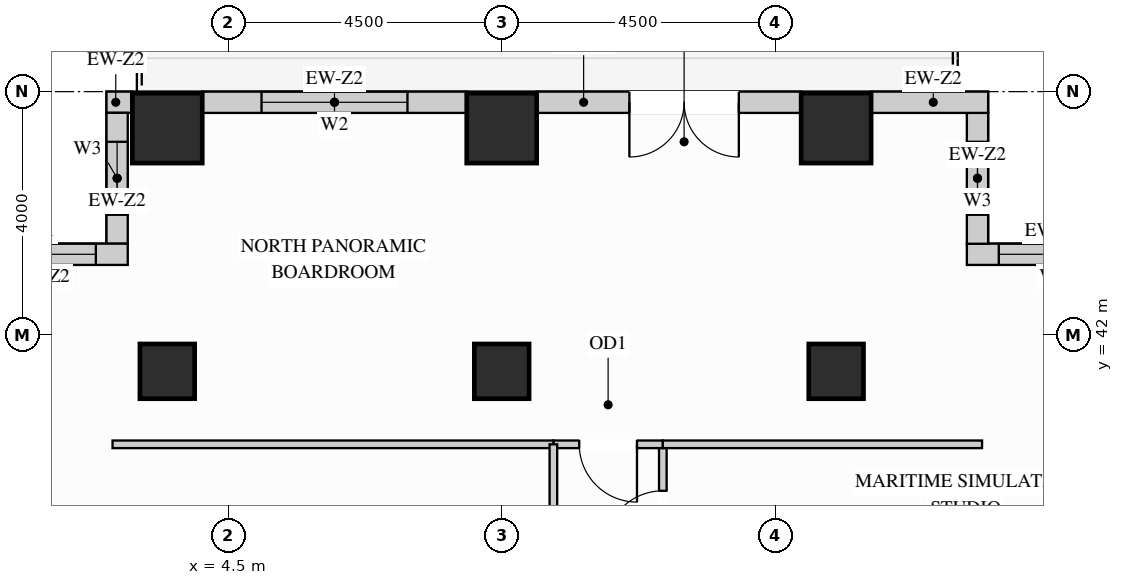
"""IFC4 building model, lengths in metres.
Left out: names, types, materials, properties, quantities, classifications, styles, units other than length and angle.
Written with IfcOpenShell. Run it as: python <this file> out.ifc"""

import sys

from ifc_helpers import new_model, si_unit, direction, frame, frame_2d, origin, origin_2d, place, context, subcontext, project, spatial, rectangle, extrude, source, transform, mapped, element, fill, save


model = new_model("IFC4")
c1 = context("Model", 3, precision=1e-05, world=origin(), true_north=direction((0.0, 1.0)))
c2 = subcontext(c1, "Body", "Model", "MODEL_VIEW")
j1 = project(units=[si_unit("LENGTHUNIT", "METRE"), si_unit("PLANEANGLEUNIT", "RADIAN")], contexts=[c1])
p1 = place(None, origin())
s1 = spatial("IfcSite", under=j1, at=p1, CompositionType="ELEMENT")
p2 = place(p1, origin())
s2 = spatial("IfcBuilding", under=s1, at=p2, CompositionType="ELEMENT")
p3 = place(p2, frame((0.0, 0.0, 77.4)))
s3 = spatial("IfcBuildingStorey", under=s2, at=p3, CompositionType="ELEMENT", Elevation=77.4)
m1 = source(origin(), c2, "Body", "SweptSolid", [
    extrude(rectangle(XDim=0.9, YDim=0.9, at=origin_2d()), origin(), (0.0, 0.0, 1.0), 3.38),
])
for number, where, z_axis, x_axis in (
    (1, (14.5, 41.4, 0.0), (0.0, 0.0, 1.0), (1.0, 0.0, 0.0)),
    (2, (3.5, 41.4, 0.0), (0.0, 0.0, 1.0), (1.0, 0.0, 0.0)),
    (3, (9.0, 41.4, 0.0), (0.0, 0.0, 1.0), (1.0, 0.0, 0.0)),
):
    element("IfcColumn", number, at=place(p3, frame(where, z_axis=z_axis, x_axis=x_axis)), inside=s3, PredefinedType="COLUMN", context=c2, shape_type="MappedRepresentation", body=[
        mapped(m1, transform((0.0, 0.0, 0.0), x_axis=(1.0, 0.0, 0.0), y_axis=(0.0, 1.0, 0.0), z_axis=(0.0, 0.0, 1.0))),
    ])
m2 = source(origin(), c2, "Body", "SweptSolid", [
    extrude(rectangle(XDim=1.15, YDim=1.15, at=origin_2d()), origin(), (0.0, 0.0, 1.0), 3.38),
])
for number, where, z_axis, x_axis in (
    (4, (14.5, 45.4, 0.0), (0.0, 0.0, 1.0), (1.0, 0.0, 0.0)),
    (5, (3.5, 45.4, 0.0), (0.0, 0.0, 1.0), (1.0, 0.0, 0.0)),
    (6, (9.0, 45.4, 0.0), (0.0, 0.0, 1.0), (1.0, 0.0, 0.0)),
):
    element("IfcColumn", number, at=place(p3, frame(where, z_axis=z_axis, x_axis=x_axis)), inside=s3, PredefinedType="COLUMN", context=c2, shape_type="MappedRepresentation", body=[
        mapped(m2, transform((0.0, 0.0, 0.0), x_axis=(1.0, 0.0, 0.0), y_axis=(0.0, 1.0, 0.0), z_axis=(0.0, 0.0, 1.0))),
    ])
p4 = place(p3, frame((19.5, 43.325, 0.0), z_axis=(0.0, 0.0, 1.0), x_axis=(-1.0, 0.0, 0.0)))
e7 = element("IfcWall", 7, at=p4, inside=s3, PredefinedType="SOLIDWALL", context=c2, shape_type="SweptSolid", body=[
    extrude(rectangle(XDim=2.85, YDim=0.35, at=frame_2d((1.425, 0.0))), origin(), (0.0, 0.0, 1.0), 3.365),
])
p5 = place(p4, frame((0.525, 0.0, 0.78)))
e8 = element("IfcOpeningElement", 8, at=p5, cuts=e7, PredefinedType="OPENING", context=c2, shape_type="SweptSolid", body=[
    extrude(rectangle(XDim=1.8, YDim=2.1, at=frame_2d((0.9, 1.05))), frame((0.0, 0.185, 0.0), z_axis=(0.0, -1.0, 0.0), x_axis=(1.0, 0.0, 0.0)), (0.0, 0.0, 1.0), 0.37),
])
p6 = place(p3, frame((16.825, 43.498, 0.0), z_axis=(0.0, 0.0, 1.0), x_axis=(0.0, 1.0, 0.0)))
e9 = element("IfcWall", 9, at=p6, inside=s3, PredefinedType="SOLIDWALL", context=c2, shape_type="SweptSolid", body=[
    extrude(rectangle(XDim=2.154, YDim=0.35, at=frame_2d((1.077, 0.0))), origin(), (0.0, 0.0, 1.0), 3.365),
])
p7 = place(p6, frame((0.477, 0.0, 0.78)))
e10 = element("IfcOpeningElement", 10, at=p7, cuts=e9, PredefinedType="OPENING", context=c2, shape_type="SweptSolid", body=[
    extrude(rectangle(XDim=1.2, YDim=2.1, at=frame_2d((0.6, 1.05))), frame((0.0, 0.185, 0.0), z_axis=(0.0, -1.0, 0.0), x_axis=(1.0, 0.0, 0.0)), (0.0, 0.0, 1.0), 0.37),
])
m3 = source(origin(), c2, "Body", "SweptSolid", [
    extrude(rectangle(XDim=1.927, YDim=0.35, at=frame_2d((0.963, 0.0))), origin(), (0.0, 0.0, 1.0), 3.365),
])
p8 = place(p3, frame((17.0, 45.825, 0.0), z_axis=(0.0, 0.0, 1.0), x_axis=(-1.0, 0.0, 0.0)))
e11 = element("IfcWall", 11, at=p8, inside=s3, PredefinedType="SOLIDWALL", context=c2, shape_type="MappedRepresentation", body=[
    mapped(m3, transform((0.0, 0.0, 0.0), x_axis=(1.0, 0.0, 0.0), y_axis=(0.0, 1.0, 0.0), z_axis=(0.0, 0.0, 1.0))),
])
p9 = place(p3, frame((13.927, 45.825, 0.0), z_axis=(0.0, 0.0, 1.0), x_axis=(-1.0, 0.0, 0.0)))
e12 = element("IfcWall", 12, at=p9, inside=s3, PredefinedType="SOLIDWALL", context=c2, shape_type="SweptSolid", body=[
    extrude(rectangle(XDim=4.354, YDim=0.35, at=frame_2d((2.177, 0.0))), origin(), (0.0, 0.0, 1.0), 3.365),
])
p10 = place(p9, frame((1.027, 0.0, 0.0)))
e13 = element("IfcOpeningElement", 13, at=p10, cuts=e12, PredefinedType="OPENING", context=c2, shape_type="SweptSolid", body=[
    extrude(rectangle(XDim=1.8, YDim=2.2, at=frame_2d((0.9, 1.1))), frame((0.0, 0.185, 0.0), z_axis=(0.0, -1.0, 0.0), x_axis=(1.0, 0.0, 0.0)), (0.0, 0.0, 1.0), 0.37),
])
p11 = place(p3, frame((8.427, 45.825, 0.0), z_axis=(0.0, 0.0, 1.0), x_axis=(-1.0, 0.0, 0.0)))
e14 = element("IfcWall", 14, at=p11, inside=s3, PredefinedType="SOLIDWALL", context=c2, shape_type="SweptSolid", body=[
    extrude(rectangle(XDim=4.354, YDim=0.35, at=frame_2d((2.177, 0.0))), origin(), (0.0, 0.0, 1.0), 3.365),
])
p12 = place(p11, frame((0.977, 0.0, 0.78)))
e15 = element("IfcOpeningElement", 15, at=p12, cuts=e14, PredefinedType="OPENING", context=c2, shape_type="SweptSolid", body=[
    extrude(rectangle(XDim=2.4, YDim=2.1, at=frame_2d((1.2, 1.05))), frame((0.0, 0.185, 0.0), z_axis=(0.0, -1.0, 0.0), x_axis=(1.0, 0.0, 0.0)), (0.0, 0.0, 1.0), 0.37),
])
m4 = source(origin(), c2, "Body", "SweptSolid", [
    extrude(rectangle(XDim=0.427, YDim=0.35, at=frame_2d((0.213, 0.0))), origin(), (0.0, 0.0, 1.0), 3.365),
])
p13 = place(p3, frame((2.927, 45.825, 0.0), z_axis=(0.0, 0.0, 1.0), x_axis=(-1.0, 0.0, 0.0)))
e16 = element("IfcWall", 16, at=p13, inside=s3, PredefinedType="SOLIDWALL", context=c2, shape_type="MappedRepresentation", body=[
    mapped(m4, transform((0.0, 0.0, 0.0), x_axis=(1.0, 0.0, 0.0), y_axis=(0.0, 1.0, 0.0), z_axis=(0.0, 0.0, 1.0))),
])
p14 = place(p3, frame((2.675, 45.652, 0.0), z_axis=(0.0, 0.0, 1.0), x_axis=(0.0, -1.0, 0.0)))
e17 = element("IfcWall", 17, at=p14, inside=s3, PredefinedType="SOLIDWALL", context=c2, shape_type="SweptSolid", body=[
    extrude(rectangle(XDim=2.154, YDim=0.35, at=frame_2d((1.077, 0.0))), origin(), (0.0, 0.0, 1.0), 3.365),
])
p15 = place(p14, frame((0.477, 0.0, 0.78)))
e18 = element("IfcOpeningElement", 18, at=p15, cuts=e17, PredefinedType="OPENING", context=c2, shape_type="SweptSolid", body=[
    extrude(rectangle(XDim=1.2, YDim=2.1, at=frame_2d((0.6, 1.05))), frame((0.0, 0.185, 0.0), z_axis=(0.0, -1.0, 0.0), x_axis=(1.0, 0.0, 0.0)), (0.0, 0.0, 1.0), 0.37),
])
p16 = place(p3, frame((2.85, 43.325, 0.0), z_axis=(0.0, 0.0, 1.0), x_axis=(-1.0, 0.0, 0.0)))
e19 = element("IfcWall", 19, at=p16, inside=s3, PredefinedType="SOLIDWALL", context=c2, shape_type="SweptSolid", body=[
    extrude(rectangle(XDim=2.85, YDim=0.35, at=frame_2d((1.425, 0.0))), origin(), (0.0, 0.0, 1.0), 3.365),
])
p17 = place(p16, frame((0.525, 0.0, 0.78)))
e20 = element("IfcOpeningElement", 20, at=p17, cuts=e19, PredefinedType="OPENING", context=c2, shape_type="SweptSolid", body=[
    extrude(rectangle(XDim=1.8, YDim=2.1, at=frame_2d((0.9, 1.05))), frame((0.0, 0.185, 0.0), z_axis=(0.0, -1.0, 0.0), x_axis=(1.0, 0.0, 0.0)), (0.0, 0.0, 1.0), 0.37),
])
p18 = place(p3, frame((11.65, 37.721, 0.0), z_axis=(0.0, 0.0, 1.0), x_axis=(0.0, 1.0, 0.0)))
e21 = element("IfcWall", 21, at=p18, inside=s3, PredefinedType="PARTITIONING", context=c2, shape_type="SweptSolid", body=[
    extrude(rectangle(XDim=2.479, YDim=0.125, at=frame_2d((1.24, 0.0))), origin(), (0.0, 0.0, 1.0), 3.365),
])
p19 = place(p18, frame((0.764, 0.0, 0.0)))
e22 = element("IfcOpeningElement", 22, at=p19, cuts=e21, PredefinedType="OPENING", context=c2, shape_type="SweptSolid", body=[
    extrude(rectangle(XDim=0.95, YDim=2.15, at=frame_2d((0.475, 1.075))), frame((0.0, 0.073, 0.0), z_axis=(0.0, -1.0, 0.0), x_axis=(1.0, 0.0, 0.0)), (0.0, 0.0, 1.0), 0.145),
])
p20 = place(p3, frame((9.85, 40.2, 0.0), z_axis=(0.0, 0.0, 1.0), x_axis=(1.0, 0.0, 0.0)))
e23 = element("IfcWall", 23, at=p20, inside=s3, PredefinedType="PARTITIONING", context=c2, shape_type="SweptSolid", body=[
    extrude(rectangle(XDim=1.8, YDim=0.125, at=frame_2d((0.9, 0.0))), origin(), (0.0, 0.0, 1.0), 3.365),
])
p21 = place(p20, frame((0.425, 0.0, 0.0)))
e24 = element("IfcOpeningElement", 24, at=p21, cuts=e23, PredefinedType="OPENING", context=c2, shape_type="SweptSolid", body=[
    extrude(rectangle(XDim=0.95, YDim=2.15, at=frame_2d((0.475, 1.075))), frame((0.0, 0.073, 0.0), z_axis=(0.0, -1.0, 0.0), x_axis=(1.0, 0.0, 0.0)), (0.0, 0.0, 1.0), 0.145),
])
m5 = source(origin(), c2, "Body", "SweptSolid", [
    extrude(rectangle(XDim=5.25, YDim=0.125, at=frame_2d((2.625, 0.0))), origin(), (0.0, 0.0, 1.0), 3.365),
])
p22 = place(p3, frame((11.65, 40.2, 0.0), z_axis=(0.0, 0.0, 1.0), x_axis=(1.0, 0.0, 0.0)))
e25 = element("IfcWall", 25, at=p22, inside=s3, PredefinedType="PARTITIONING", context=c2, shape_type="MappedRepresentation", body=[
    mapped(m5, transform((0.0, 0.0, 0.0), x_axis=(1.0, 0.0, 0.0), y_axis=(0.0, 1.0, 0.0), z_axis=(0.0, 0.0, 1.0))),
])
m6 = source(origin(), c2, "Body", "SweptSolid", [
    extrude(rectangle(XDim=7.25, YDim=0.125, at=frame_2d((3.625, 0.0))), origin(), (0.0, 0.0, 1.0), 3.365),
])
p23 = place(p3, frame((2.6, 40.2, 0.0), z_axis=(0.0, 0.0, 1.0), x_axis=(1.0, 0.0, 0.0)))
e26 = element("IfcWall", 26, at=p23, inside=s3, PredefinedType="PARTITIONING", context=c2, shape_type="MappedRepresentation", body=[
    mapped(m6, transform((0.0, 0.0, 0.0), x_axis=(1.0, 0.0, 0.0), y_axis=(0.0, 1.0, 0.0), z_axis=(0.0, 0.0, 1.0))),
])
p24 = place(p3, frame((9.85, 35.498, 0.0), z_axis=(0.0, 0.0, 1.0), x_axis=(0.0, 1.0, 0.0)))
e27 = element("IfcWall", 27, at=p24, inside=s3, PredefinedType="PARTITIONING", context=c2, shape_type="SweptSolid", body=[
    extrude(rectangle(XDim=4.702, YDim=0.125, at=frame_2d((2.351, 0.0))), origin(), (0.0, 0.0, 1.0), 3.365),
])
p25 = place(p24, frame((0.392, 0.0, 0.0)))
e28 = element("IfcOpeningElement", 28, at=p25, cuts=e27, PredefinedType="OPENING", context=c2, shape_type="SweptSolid", body=[
    extrude(rectangle(XDim=0.95, YDim=2.15, at=frame_2d((0.475, 1.075))), frame((0.0, 0.073, 0.0), z_axis=(0.0, -1.0, 0.0), x_axis=(1.0, 0.0, 0.0)), (0.0, 0.0, 1.0), 0.145),
])
m7 = source(origin(), c2, "Body", "SweptSolid", [
    extrude(rectangle(XDim=1.8, YDim=2.2, at=frame_2d((0.9, 1.1))), frame((0.0, 0.025, 0.0), z_axis=(0.0, -1.0, 0.0), x_axis=(1.0, 0.0, 0.0)), (0.0, 0.0, 1.0), 0.05),
])
p26 = place(p10, frame((1.8, 0.0, 0.0), z_axis=(0.0, 0.0, 1.0), x_axis=(-1.0, 0.0, 0.0)))
e29 = element("IfcDoor", 29, at=p26, inside=s3, OperationType="DOUBLE_DOOR_SINGLE_SWING", PredefinedType="DOOR", context=c2, shape_type="MappedRepresentation", body=[
    mapped(m7, transform((0.0, 0.0, 0.0), x_axis=(1.0, 0.0, 0.0), y_axis=(0.0, 1.0, 0.0), z_axis=(0.0, 0.0, 1.0))),
])
fill(e13, e29)
m8 = source(origin(), c2, "Body", "SweptSolid", [
    extrude(rectangle(XDim=0.95, YDim=2.15, at=frame_2d((0.475, 1.075))), frame((0.0, 0.025, 0.0), z_axis=(0.0, -1.0, 0.0), x_axis=(1.0, 0.0, 0.0)), (0.0, 0.0, 1.0), 0.05),
])
p27 = place(p19, origin())
e30 = element("IfcDoor", 30, at=p27, inside=s3, OperationType="SINGLE_SWING_LEFT", PredefinedType="DOOR", context=c2, shape_type="MappedRepresentation", body=[
    mapped(m8, transform((0.0, 0.0, 0.0), x_axis=(1.0, 0.0, 0.0), y_axis=(0.0, 1.0, 0.0), z_axis=(0.0, 0.0, 1.0))),
])
fill(e22, e30)
p28 = place(p21, origin())
e31 = element("IfcDoor", 31, at=p28, inside=s3, OperationType="SINGLE_SWING_RIGHT", PredefinedType="DOOR", context=c2, shape_type="MappedRepresentation", body=[
    mapped(m8, transform((0.0, 0.0, 0.0), x_axis=(1.0, 0.0, 0.0), y_axis=(0.0, 1.0, 0.0), z_axis=(0.0, 0.0, 1.0))),
])
fill(e24, e31)
m9 = source(origin(), c2, "Body", "SweptSolid", [
    extrude(rectangle(XDim=1.8, YDim=2.1, at=frame_2d((0.9, 1.05))), frame((0.0, 0.03, 0.0), z_axis=(0.0, -1.0, 0.0), x_axis=(1.0, 0.0, 0.0)), (0.0, 0.0, 1.0), 0.06),
])
p29 = place(p5, origin())
e32 = element("IfcWindow", 32, at=p29, inside=s3, PartitioningType="SINGLE_PANEL", PredefinedType="WINDOW", context=c2, shape_type="MappedRepresentation", body=[
    mapped(m9, transform((0.0, 0.0, 0.0), x_axis=(1.0, 0.0, 0.0), y_axis=(0.0, 1.0, 0.0), z_axis=(0.0, 0.0, 1.0))),
])
fill(e8, e32)
p30 = place(p17, origin())
e33 = element("IfcWindow", 33, at=p30, inside=s3, PartitioningType="SINGLE_PANEL", PredefinedType="WINDOW", context=c2, shape_type="MappedRepresentation", body=[
    mapped(m9, transform((0.0, 0.0, 0.0), x_axis=(1.0, 0.0, 0.0), y_axis=(0.0, 1.0, 0.0), z_axis=(0.0, 0.0, 1.0))),
])
fill(e20, e33)
m10 = source(origin(), c2, "Body", "SweptSolid", [
    extrude(rectangle(XDim=2.4, YDim=2.1, at=frame_2d((1.2, 1.05))), frame((0.0, 0.03, 0.0), z_axis=(0.0, -1.0, 0.0), x_axis=(1.0, 0.0, 0.0)), (0.0, 0.0, 1.0), 0.06),
])
p31 = place(p12, origin())
e34 = element("IfcWindow", 34, at=p31, inside=s3, PartitioningType="SINGLE_PANEL", PredefinedType="WINDOW", context=c2, shape_type="MappedRepresentation", body=[
    mapped(m10, transform((0.0, 0.0, 0.0), x_axis=(1.0, 0.0, 0.0), y_axis=(0.0, 1.0, 0.0), z_axis=(0.0, 0.0, 1.0))),
])
fill(e15, e34)
m11 = source(origin(), c2, "Body", "SweptSolid", [
    extrude(rectangle(XDim=1.2, YDim=2.1, at=frame_2d((0.6, 1.05))), frame((0.0, 0.03, 0.0), z_axis=(0.0, -1.0, 0.0), x_axis=(1.0, 0.0, 0.0)), (0.0, 0.0, 1.0), 0.06),
])
p32 = place(p7, origin())
e35 = element("IfcWindow", 35, at=p32, inside=s3, PartitioningType="SINGLE_PANEL", PredefinedType="WINDOW", context=c2, shape_type="MappedRepresentation", body=[
    mapped(m11, transform((0.0, 0.0, 0.0), x_axis=(1.0, 0.0, 0.0), y_axis=(0.0, 1.0, 0.0), z_axis=(0.0, 0.0, 1.0))),
])
fill(e10, e35)
p33 = place(p15, origin())
e36 = element("IfcWindow", 36, at=p33, inside=s3, PartitioningType="SINGLE_PANEL", PredefinedType="WINDOW", context=c2, shape_type="MappedRepresentation", body=[
    mapped(m11, transform((0.0, 0.0, 0.0), x_axis=(1.0, 0.0, 0.0), y_axis=(0.0, 1.0, 0.0), z_axis=(0.0, 0.0, 1.0))),
])
fill(e18, e36)
save(model, sys.argv[1])
